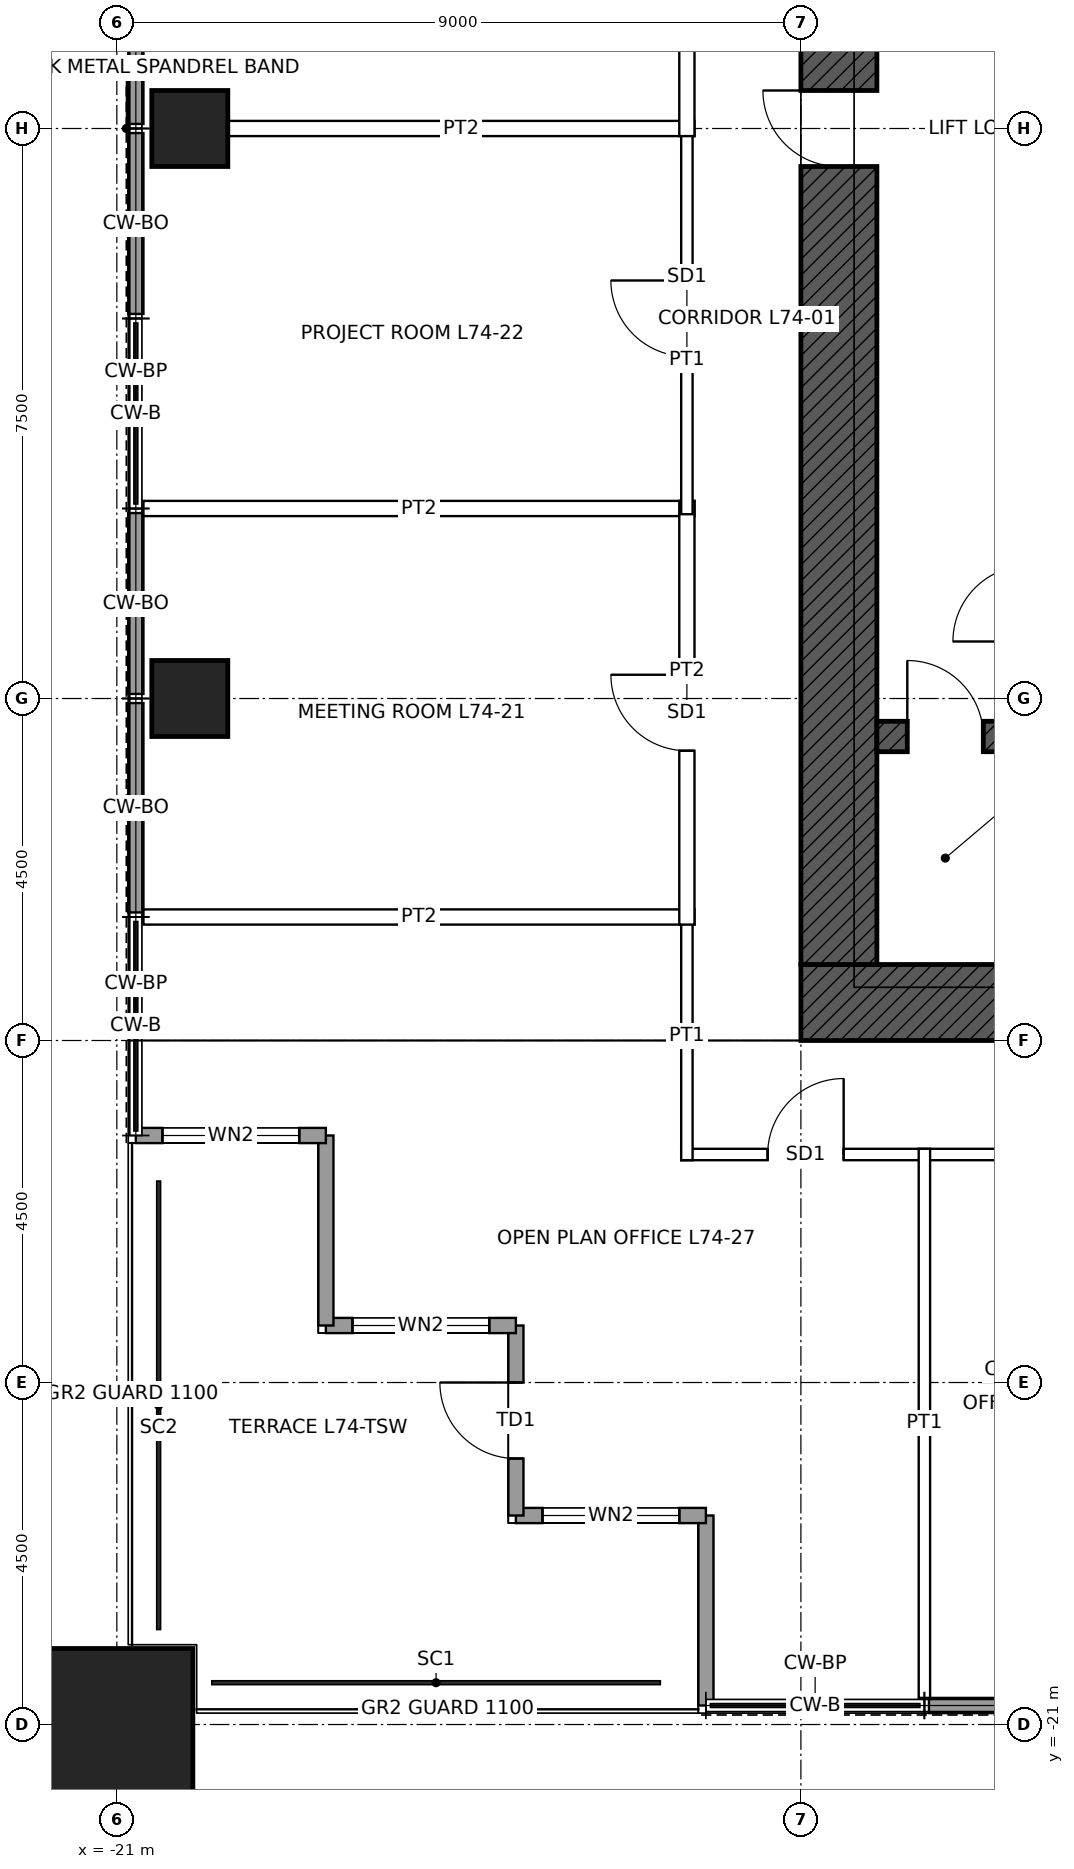
"""IFC4 building model, lengths in metres.
Left out: names, types, materials, properties, quantities, classifications, styles, units other than length and angle.
Written with IfcOpenShell. Run it as: python <this file> out.ifc"""

import sys

from ifc_helpers import new_model, si_unit, direction, frame, frame_2d, origin, origin_2d, place, context, subcontext, project, spatial, rectangle, hollow_rectangle, extrude, element, fill, save


model = new_model("IFC4")
c1 = context("Model", 3, precision=1e-05, world=origin(), true_north=direction((0.0, 1.0)))
c2 = subcontext(c1, "Body", "Model", "MODEL_VIEW")
j1 = project(units=[si_unit("LENGTHUNIT", "METRE"), si_unit("PLANEANGLEUNIT", "RADIAN")], contexts=[c1])
p1 = place(None, origin())
s1 = spatial("IfcSite", under=j1, at=p1, CompositionType="ELEMENT")
p2 = place(p1, origin())
s2 = spatial("IfcBuilding", under=s1, at=p2, CompositionType="ELEMENT")
p3 = place(p2, frame((0.0, 0.0, 331.9)))
s3 = spatial("IfcBuildingStorey", under=s2, at=p3, CompositionType="ELEMENT", Elevation=331.9)
p4 = place(p3, frame((-21.0, -21.0, 0.0), z_axis=(0.0, 0.0, 1.0), x_axis=(1.0, 0.0, 0.0)))
e1 = element("IfcColumn", 1, at=p4, inside=s3, PredefinedType="COLUMN", context=c2, shape_type="SweptSolid", body=[
    extrude(hollow_rectangle(XDim=2.0, YDim=2.0, WallThickness=0.095, at=origin_2d()), origin(), (0.0, 0.0, 1.0), 4.0),
])
for number, where, z_axis, x_axis in (
    (2, (-20.04, -7.5, 0.0), (0.0, 0.0, 1.0), (1.0, 0.0, 0.0)),
    (3, (-20.04, 0.0, 0.0), (0.0, 0.0, 1.0), (1.0, 0.0, 0.0)),
):
    element("IfcColumn", number, at=place(p3, frame(where, z_axis=z_axis, x_axis=x_axis)), inside=s3, PredefinedType="COLUMN", context=c2, shape_type="SweptSolid", body=[
        extrude(hollow_rectangle(XDim=1.0, YDim=1.0, WallThickness=0.075, at=origin_2d()), origin(), (0.0, 0.0, 1.0), 4.0),
    ])
p5 = place(p3, frame((12.0, -11.5, 0.0), z_axis=(0.0, 0.0, 1.0), x_axis=(-1.0, 0.0, 0.0)))
e4 = element("IfcWall", 4, at=p5, inside=s3, PredefinedType="SHEAR", context=c2, shape_type="SweptSolid", body=[
    extrude(rectangle(XDim=24.0, YDim=1.0, at=frame_2d((12.0, 0.0))), origin(), (0.0, 0.0, 1.0), 4.0),
])
p6 = place(p5, frame((11.5, 0.0, 0.0)))
e5 = element("IfcOpeningElement", 5, at=p6, cuts=e4, PredefinedType="OPENING", context=c2, shape_type="SweptSolid", body=[
    extrude(rectangle(XDim=1.0, YDim=2.1, at=frame_2d((0.5, 1.05))), frame((0.0, 0.51, 0.0), z_axis=(0.0, -1.0, 0.0), x_axis=(1.0, 0.0, 0.0)), (0.0, 0.0, 1.0), 1.02),
])
p7 = place(p5, frame((1.0, 0.0, 0.0)))
e6 = element("IfcOpeningElement", 6, at=p7, cuts=e4, PredefinedType="OPENING", context=c2, shape_type="SweptSolid", body=[
    extrude(rectangle(XDim=1.0, YDim=2.4, at=frame_2d((0.5, 1.2))), frame((0.0, 0.51, 0.0), z_axis=(0.0, -1.0, 0.0), x_axis=(1.0, 0.0, 0.0)), (0.0, 0.0, 1.0), 1.02),
])
p8 = place(p3, frame((-11.5, -11.0, 0.0), z_axis=(0.0, 0.0, 1.0), x_axis=(0.0, 1.0, 0.0)))
e7 = element("IfcWall", 7, at=p8, inside=s3, PredefinedType="SHEAR", context=c2, shape_type="SweptSolid", body=[
    extrude(rectangle(XDim=22.0, YDim=1.0, at=frame_2d((11.0, 0.0))), origin(), (0.0, 0.0, 1.0), 4.0),
])
p9 = place(p8, frame((10.5, 0.0, 0.0)))
e8 = element("IfcOpeningElement", 8, at=p9, cuts=e7, PredefinedType="OPENING", context=c2, shape_type="SweptSolid", body=[
    extrude(rectangle(XDim=1.0, YDim=2.4, at=frame_2d((0.5, 1.2))), frame((0.0, 0.51, 0.0), z_axis=(0.0, -1.0, 0.0), x_axis=(1.0, 0.0, 0.0)), (0.0, 0.0, 1.0), 1.02),
])
p10 = place(p3, frame((-11.0, -8.0, 0.0), z_axis=(0.0, 0.0, 1.0), x_axis=(1.0, 0.0, 0.0)))
e9 = element("IfcWall", 9, at=p10, inside=s3, PredefinedType="SHEAR", context=c2, shape_type="SweptSolid", body=[
    extrude(rectangle(XDim=2.0, YDim=0.4, at=frame_2d((1.0, 0.0))), origin(), (0.0, 0.0, 1.0), 4.0),
])
p11 = place(p10, frame((0.4, 0.0, 0.0)))
e10 = element("IfcOpeningElement", 10, at=p11, cuts=e9, PredefinedType="OPENING", context=c2, shape_type="SweptSolid", body=[
    extrude(rectangle(XDim=1.0, YDim=2.1, at=frame_2d((0.5, 1.05))), frame((0.0, 0.21, 0.0), z_axis=(0.0, -1.0, 0.0), x_axis=(1.0, 0.0, 0.0)), (0.0, 0.0, 1.0), 0.42),
])
p12 = place(p3, frame((-13.25, -20.75, 0.0), z_axis=(0.0, 0.0, 1.0), x_axis=(0.0, 1.0, 0.0)))
e11 = element("IfcWall", 11, at=p12, inside=s3, PredefinedType="SOLIDWALL", context=c2, shape_type="SweptSolid", body=[
    extrude(rectangle(XDim=2.5, YDim=0.2, at=frame_2d((1.25, 0.0))), origin(), (0.0, 0.0, 1.0), 3.8),
])
p13 = place(p3, frame((-13.25, -18.25, 0.0), z_axis=(0.0, 0.0, 1.0), x_axis=(-1.0, 0.0, 0.0)))
e12 = element("IfcWall", 12, at=p13, inside=s3, PredefinedType="SOLIDWALL", context=c2, shape_type="SweptSolid", body=[
    extrude(rectangle(XDim=2.5, YDim=0.2, at=frame_2d((1.25, 0.0))), origin(), (0.0, 0.0, 1.0), 3.8),
])
p14 = place(p13, frame((0.35, 0.0, 0.3)))
e13 = element("IfcOpeningElement", 13, at=p14, cuts=e12, PredefinedType="OPENING", context=c2, shape_type="SweptSolid", body=[
    extrude(rectangle(XDim=1.8, YDim=2.4, at=frame_2d((0.9, 1.2))), frame((0.0, 0.11, 0.0), z_axis=(0.0, -1.0, 0.0), x_axis=(1.0, 0.0, 0.0)), (0.0, 0.0, 1.0), 0.22),
])
p15 = place(p3, frame((-15.75, -18.25, 0.0), z_axis=(0.0, 0.0, 1.0), x_axis=(0.0, 1.0, 0.0)))
e14 = element("IfcWall", 14, at=p15, inside=s3, PredefinedType="SOLIDWALL", context=c2, shape_type="SweptSolid", body=[
    extrude(rectangle(XDim=2.5, YDim=0.2, at=frame_2d((1.25, 0.0))), origin(), (0.0, 0.0, 1.0), 2.888),
])
p16 = place(p15, frame((0.75, 0.0, 0.0)))
e15 = element("IfcOpeningElement", 15, at=p16, cuts=e14, PredefinedType="OPENING", context=c2, shape_type="SweptSolid", body=[
    extrude(rectangle(XDim=1.0, YDim=2.4, at=frame_2d((0.5, 1.2))), frame((0.0, 0.11, 0.0), z_axis=(0.0, -1.0, 0.0), x_axis=(1.0, 0.0, 0.0)), (0.0, 0.0, 1.0), 0.22),
])
p17 = place(p3, frame((-15.75, -15.75, 0.0), z_axis=(0.0, 0.0, 1.0), x_axis=(-1.0, 0.0, 0.0)))
e16 = element("IfcWall", 16, at=p17, inside=s3, PredefinedType="SOLIDWALL", context=c2, shape_type="SweptSolid", body=[
    extrude(rectangle(XDim=2.5, YDim=0.2, at=frame_2d((1.25, 0.0))), origin(), (0.0, 0.0, 1.0), 3.8),
])
p18 = place(p17, frame((0.35, 0.0, 0.3)))
e17 = element("IfcOpeningElement", 17, at=p18, cuts=e16, PredefinedType="OPENING", context=c2, shape_type="SweptSolid", body=[
    extrude(rectangle(XDim=1.8, YDim=2.4, at=frame_2d((0.9, 1.2))), frame((0.0, 0.11, 0.0), z_axis=(0.0, -1.0, 0.0), x_axis=(1.0, 0.0, 0.0)), (0.0, 0.0, 1.0), 0.22),
])
p19 = place(p3, frame((-18.25, -15.75, 0.0), z_axis=(0.0, 0.0, 1.0), x_axis=(0.0, 1.0, 0.0)))
e18 = element("IfcWall", 18, at=p19, inside=s3, PredefinedType="SOLIDWALL", context=c2, shape_type="SweptSolid", body=[
    extrude(rectangle(XDim=2.5, YDim=0.2, at=frame_2d((1.25, 0.0))), origin(), (0.0, 0.0, 1.0), 3.8),
])
p20 = place(p3, frame((-18.25, -13.25, 0.0), z_axis=(0.0, 0.0, 1.0), x_axis=(-1.0, 0.0, 0.0)))
e19 = element("IfcWall", 19, at=p20, inside=s3, PredefinedType="SOLIDWALL", context=c2, shape_type="SweptSolid", body=[
    extrude(rectangle(XDim=2.5, YDim=0.2, at=frame_2d((1.25, 0.0))), origin(), (0.0, 0.0, 1.0), 3.8),
])
p21 = place(p20, frame((0.35, 0.0, 0.3)))
e20 = element("IfcOpeningElement", 20, at=p21, cuts=e19, PredefinedType="OPENING", context=c2, shape_type="SweptSolid", body=[
    extrude(rectangle(XDim=1.8, YDim=2.4, at=frame_2d((0.9, 1.2))), frame((0.0, 0.11, 0.0), z_axis=(0.0, -1.0, 0.0), x_axis=(1.0, 0.0, 0.0)), (0.0, 0.0, 1.0), 0.22),
])
for number, where, z_axis, x_axis in (
    (21, (-7.56, -20.75, 0.0), (0.0, 0.0, 1.0), (-1.0, 0.0, 0.0)),
    (22, (-20.75, -10.315, 0.0), (0.0, 0.0, 1.0), (0.0, 1.0, 0.0)),
):
    element("IfcWall", number, at=place(p3, frame(where, z_axis=z_axis, x_axis=x_axis)), inside=s3, PredefinedType="SOLIDWALL", context=c2, shape_type="SweptSolid", body=[
        extrude(rectangle(XDim=2.755, YDim=0.2, at=frame_2d((1.377, 0.0))), origin(), (0.0, 0.0, 1.0), 3.8),
    ])
for number, where, z_axis, x_axis in (
    (23, (-20.75, -7.44, 0.0), (0.0, 0.0, 1.0), (0.0, 1.0, 0.0)),
    (24, (-20.75, -2.44, 0.0), (0.0, 0.0, 1.0), (0.0, 1.0, 0.0)),
    (25, (-20.75, 0.06, 0.0), (0.0, 0.0, 1.0), (0.0, 1.0, 0.0)),
):
    element("IfcWall", number, at=place(p3, frame(where, z_axis=z_axis, x_axis=x_axis)), inside=s3, PredefinedType="SOLIDWALL", context=c2, shape_type="SweptSolid", body=[
        extrude(rectangle(XDim=2.38, YDim=0.2, at=frame_2d((1.19, 0.0))), origin(), (0.0, 0.0, 1.0), 3.8),
    ])
p22 = place(p3, frame((-13.575, -13.5, 0.0), z_axis=(0.0, 0.0, 1.0), x_axis=(1.0, 0.0, 0.0)))
e26 = element("IfcWall", 26, at=p22, inside=s3, PredefinedType="PARTITIONING", context=c2, shape_type="SweptSolid", body=[
    extrude(rectangle(XDim=27.15, YDim=0.15, at=frame_2d((13.575, 0.0))), origin(), (0.0, 0.0, 1.0), 3.8),
])
p23 = place(p22, frame((21.475, 0.0, 0.0)))
e27 = element("IfcOpeningElement", 27, at=p23, cuts=e26, PredefinedType="OPENING", context=c2, shape_type="SweptSolid", body=[
    extrude(rectangle(XDim=1.0, YDim=2.4, at=frame_2d((0.5, 1.2))), frame((0.0, 0.085, 0.0), z_axis=(0.0, -1.0, 0.0), x_axis=(1.0, 0.0, 0.0)), (0.0, 0.0, 1.0), 0.17),
])
p24 = place(p22, frame((19.325, 0.0, 0.0)))
e28 = element("IfcOpeningElement", 28, at=p24, cuts=e26, PredefinedType="OPENING", context=c2, shape_type="SweptSolid", body=[
    extrude(rectangle(XDim=1.0, YDim=2.4, at=frame_2d((0.5, 1.2))), frame((0.0, 0.085, 0.0), z_axis=(0.0, -1.0, 0.0), x_axis=(1.0, 0.0, 0.0)), (0.0, 0.0, 1.0), 0.17),
])
p25 = place(p22, frame((16.825, 0.0, 0.0)))
e29 = element("IfcOpeningElement", 29, at=p25, cuts=e26, PredefinedType="OPENING", context=c2, shape_type="SweptSolid", body=[
    extrude(rectangle(XDim=1.0, YDim=2.4, at=frame_2d((0.5, 1.2))), frame((0.0, 0.085, 0.0), z_axis=(0.0, -1.0, 0.0), x_axis=(1.0, 0.0, 0.0)), (0.0, 0.0, 1.0), 0.17),
])
p26 = place(p22, frame((14.675, 0.0, 0.0)))
e30 = element("IfcOpeningElement", 30, at=p26, cuts=e26, PredefinedType="OPENING", context=c2, shape_type="SweptSolid", body=[
    extrude(rectangle(XDim=1.0, YDim=2.4, at=frame_2d((0.5, 1.2))), frame((0.0, 0.085, 0.0), z_axis=(0.0, -1.0, 0.0), x_axis=(1.0, 0.0, 0.0)), (0.0, 0.0, 1.0), 0.17),
])
p27 = place(p22, frame((11.475, 0.0, 0.0)))
e31 = element("IfcOpeningElement", 31, at=p27, cuts=e26, PredefinedType="OPENING", context=c2, shape_type="SweptSolid", body=[
    extrude(rectangle(XDim=1.0, YDim=2.4, at=frame_2d((0.5, 1.2))), frame((0.0, 0.085, 0.0), z_axis=(0.0, -1.0, 0.0), x_axis=(1.0, 0.0, 0.0)), (0.0, 0.0, 1.0), 0.17),
])
p28 = place(p22, frame((9.325, 0.0, 0.0)))
e32 = element("IfcOpeningElement", 32, at=p28, cuts=e26, PredefinedType="OPENING", context=c2, shape_type="SweptSolid", body=[
    extrude(rectangle(XDim=1.0, YDim=2.4, at=frame_2d((0.5, 1.2))), frame((0.0, 0.085, 0.0), z_axis=(0.0, -1.0, 0.0), x_axis=(1.0, 0.0, 0.0)), (0.0, 0.0, 1.0), 0.17),
])
p29 = place(p22, frame((6.825, 0.0, 0.0)))
e33 = element("IfcOpeningElement", 33, at=p29, cuts=e26, PredefinedType="OPENING", context=c2, shape_type="SweptSolid", body=[
    extrude(rectangle(XDim=1.0, YDim=2.4, at=frame_2d((0.5, 1.2))), frame((0.0, 0.085, 0.0), z_axis=(0.0, -1.0, 0.0), x_axis=(1.0, 0.0, 0.0)), (0.0, 0.0, 1.0), 0.17),
])
p30 = place(p22, frame((4.137, 0.0, 0.0)))
e34 = element("IfcOpeningElement", 34, at=p30, cuts=e26, PredefinedType="OPENING", context=c2, shape_type="SweptSolid", body=[
    extrude(rectangle(XDim=1.0, YDim=2.4, at=frame_2d((0.5, 1.2))), frame((0.0, 0.085, 0.0), z_axis=(0.0, -1.0, 0.0), x_axis=(1.0, 0.0, 0.0)), (0.0, 0.0, 1.0), 0.17),
])
p31 = place(p22, frame((25.278, 0.0, 0.0)))
e35 = element("IfcOpeningElement", 35, at=p31, cuts=e26, PredefinedType="OPENING", context=c2, shape_type="SweptSolid", body=[
    extrude(rectangle(XDim=1.0, YDim=2.4, at=frame_2d((0.5, 1.2))), frame((0.0, 0.085, 0.0), z_axis=(0.0, -1.0, 0.0), x_axis=(1.0, 0.0, 0.0)), (0.0, 0.0, 1.0), 0.17),
])
p32 = place(p22, frame((1.137, 0.0, 0.0)))
e36 = element("IfcOpeningElement", 36, at=p32, cuts=e26, PredefinedType="OPENING", context=c2, shape_type="SweptSolid", body=[
    extrude(rectangle(XDim=1.0, YDim=2.4, at=frame_2d((0.5, 1.2))), frame((0.0, 0.085, 0.0), z_axis=(0.0, -1.0, 0.0), x_axis=(1.0, 0.0, 0.0)), (0.0, 0.0, 1.0), 0.17),
])
for number, where, z_axis, x_axis in (
    (37, (-20.65, -10.375, 0.0), (0.0, 0.0, 1.0), (1.0, 0.0, 0.0)),
    (38, (-20.65, -5.0, 0.0), (0.0, 0.0, 1.0), (1.0, 0.0, 0.0)),
):
    element("IfcWall", number, at=place(p3, frame(where, z_axis=z_axis, x_axis=x_axis)), inside=s3, PredefinedType="PARTITIONING", context=c2, shape_type="SweptSolid", body=[
        extrude(rectangle(XDim=7.25, YDim=0.2, at=frame_2d((3.625, 0.0))), origin(), (0.0, 0.0, 1.0), 3.8),
    ])
p33 = place(p3, frame((-19.54, 0.0, 0.0), z_axis=(0.0, 0.0, 1.0), x_axis=(1.0, 0.0, 0.0)))
e39 = element("IfcWall", 39, at=p33, inside=s3, PredefinedType="PARTITIONING", context=c2, shape_type="SweptSolid", body=[
    extrude(rectangle(XDim=6.14, YDim=0.2, at=frame_2d((3.07, 0.0))), origin(), (0.0, 0.0, 1.0), 2.769),
])
p34 = place(p3, frame((-13.5, -13.575, 0.0), z_axis=(0.0, 0.0, 1.0), x_axis=(0.0, 1.0, 0.0)))
e40 = element("IfcWall", 40, at=p34, inside=s3, PredefinedType="PARTITIONING", context=c2, shape_type="SweptSolid", body=[
    extrude(rectangle(XDim=3.275, YDim=0.15, at=frame_2d((1.637, 0.0))), origin(), (0.0, 0.0, 1.0), 3.8),
])
p35 = place(p3, frame((-13.5, -10.475, 0.0), z_axis=(0.0, 0.0, 1.0), x_axis=(0.0, 1.0, 0.0)))
e41 = element("IfcWall", 41, at=p35, inside=s3, PredefinedType="PARTITIONING", context=c2, shape_type="SweptSolid", body=[
    extrude(rectangle(XDim=5.575, YDim=0.2, at=frame_2d((2.788, 0.0))), origin(), (0.0, 0.0, 1.0), 3.8),
])
p36 = place(p35, frame((2.288, 0.0, 0.0)))
e42 = element("IfcOpeningElement", 42, at=p36, cuts=e41, PredefinedType="OPENING", context=c2, shape_type="SweptSolid", body=[
    extrude(rectangle(XDim=1.0, YDim=2.4, at=frame_2d((0.5, 1.2))), frame((0.0, 0.11, 0.0), z_axis=(0.0, -1.0, 0.0), x_axis=(1.0, 0.0, 0.0)), (0.0, 0.0, 1.0), 0.22),
])
p37 = place(p3, frame((-13.5, -5.075, 0.0), z_axis=(0.0, 0.0, 1.0), x_axis=(0.0, 1.0, 0.0)))
e43 = element("IfcWall", 43, at=p37, inside=s3, PredefinedType="PARTITIONING", context=c2, shape_type="SweptSolid", body=[
    extrude(rectangle(XDim=5.15, YDim=0.15, at=frame_2d((2.575, 0.0))), origin(), (0.0, 0.0, 1.0), 3.8),
])
p38 = place(p37, frame((2.075, 0.0, 0.0)))
e44 = element("IfcOpeningElement", 44, at=p38, cuts=e43, PredefinedType="OPENING", context=c2, shape_type="SweptSolid", body=[
    extrude(rectangle(XDim=1.0, YDim=2.4, at=frame_2d((0.5, 1.2))), frame((0.0, 0.085, 0.0), z_axis=(0.0, -1.0, 0.0), x_axis=(1.0, 0.0, 0.0)), (0.0, 0.0, 1.0), 0.17),
])
p39 = place(p3, frame((-13.5, -0.1, 0.0), z_axis=(0.0, 0.0, 1.0), x_axis=(0.0, 1.0, 0.0)))
e45 = element("IfcWall", 45, at=p39, inside=s3, PredefinedType="PARTITIONING", context=c2, shape_type="SweptSolid", body=[
    extrude(rectangle(XDim=5.2, YDim=0.2, at=frame_2d((2.6, 0.0))), origin(), (0.0, 0.0, 1.0), 3.8),
])
p40 = place(p39, frame((2.1, 0.0, 0.0)))
e46 = element("IfcOpeningElement", 46, at=p40, cuts=e45, PredefinedType="OPENING", context=c2, shape_type="SweptSolid", body=[
    extrude(rectangle(XDim=1.0, YDim=2.4, at=frame_2d((0.5, 1.2))), frame((0.0, 0.11, 0.0), z_axis=(0.0, -1.0, 0.0), x_axis=(1.0, 0.0, 0.0)), (0.0, 0.0, 1.0), 0.22),
])
p41 = place(p3, frame((-10.375, -20.65, 0.0), z_axis=(0.0, 0.0, 1.0), x_axis=(0.0, 1.0, 0.0)))
e47 = element("IfcWall", 47, at=p41, inside=s3, PredefinedType="PARTITIONING", context=c2, shape_type="SweptSolid", body=[
    extrude(rectangle(XDim=7.225, YDim=0.15, at=frame_2d((3.612, 0.0))), origin(), (0.0, 0.0, 1.0), 3.8),
])
p42 = place(p14, origin())
e48 = element("IfcWindow", 48, at=p42, inside=s3, PartitioningType="SINGLE_PANEL", PredefinedType="WINDOW", context=c2, shape_type="SweptSolid", body=[
    extrude(rectangle(XDim=1.8, YDim=2.4, at=frame_2d((0.9, 1.2))), frame((0.0, 0.03, 0.0), z_axis=(0.0, -1.0, 0.0), x_axis=(1.0, 0.0, 0.0)), (0.0, 0.0, 1.0), 0.06),
])
fill(e13, e48)
p43 = place(p16, origin())
e49 = element("IfcDoor", 49, at=p43, inside=s3, OperationType="SINGLE_SWING_RIGHT", PredefinedType="DOOR", context=c2, shape_type="SweptSolid", body=[
    extrude(rectangle(XDim=1.0, YDim=2.4, at=frame_2d((0.5, 1.2))), frame((0.0, 0.025, 0.0), z_axis=(0.0, -1.0, 0.0), x_axis=(1.0, 0.0, 0.0)), (0.0, 0.0, 1.0), 0.05),
])
fill(e15, e49)
p44 = place(p18, origin())
e50 = element("IfcWindow", 50, at=p44, inside=s3, PartitioningType="SINGLE_PANEL", PredefinedType="WINDOW", context=c2, shape_type="SweptSolid", body=[
    extrude(rectangle(XDim=1.8, YDim=2.4, at=frame_2d((0.9, 1.2))), frame((0.0, 0.03, 0.0), z_axis=(0.0, -1.0, 0.0), x_axis=(1.0, 0.0, 0.0)), (0.0, 0.0, 1.0), 0.06),
])
fill(e17, e50)
p45 = place(p21, origin())
e51 = element("IfcWindow", 51, at=p45, inside=s3, PartitioningType="SINGLE_PANEL", PredefinedType="WINDOW", context=c2, shape_type="SweptSolid", body=[
    extrude(rectangle(XDim=1.8, YDim=2.4, at=frame_2d((0.9, 1.2))), frame((0.0, 0.03, 0.0), z_axis=(0.0, -1.0, 0.0), x_axis=(1.0, 0.0, 0.0)), (0.0, 0.0, 1.0), 0.06),
])
fill(e20, e51)
p46 = place(p9, origin())
e52 = element("IfcDoor", 52, at=p46, inside=s3, OperationType="SINGLE_SWING_RIGHT", PredefinedType="DOOR", context=c2, shape_type="SweptSolid", body=[
    extrude(rectangle(XDim=1.0, YDim=2.4, at=frame_2d((0.5, 1.2))), frame((0.0, 0.485, 0.0), z_axis=(0.0, -1.0, 0.0), x_axis=(1.0, 0.0, 0.0)), (0.0, 0.0, 1.0), 0.05),
])
fill(e8, e52)
p47 = place(p11, origin())
e53 = element("IfcDoor", 53, at=p47, inside=s3, OperationType="SINGLE_SWING_LEFT", PredefinedType="DOOR", context=c2, shape_type="SweptSolid", body=[
    extrude(rectangle(XDim=1.0, YDim=2.1, at=frame_2d((0.5, 1.05))), frame((0.0, 0.025, 0.0), z_axis=(0.0, -1.0, 0.0), x_axis=(1.0, 0.0, 0.0)), (0.0, 0.0, 1.0), 0.05),
])
fill(e10, e53)
p48 = place(p36, origin())
e54 = element("IfcDoor", 54, at=p48, inside=s3, OperationType="SINGLE_SWING_RIGHT", PredefinedType="DOOR", context=c2, shape_type="SweptSolid", body=[
    extrude(rectangle(XDim=1.0, YDim=2.4, at=frame_2d((0.5, 1.2))), frame((0.0, 0.025, 0.0), z_axis=(0.0, -1.0, 0.0), x_axis=(1.0, 0.0, 0.0)), (0.0, 0.0, 1.0), 0.05),
])
fill(e42, e54)
p49 = place(p38, origin())
e55 = element("IfcDoor", 55, at=p49, inside=s3, OperationType="SINGLE_SWING_RIGHT", PredefinedType="DOOR", context=c2, shape_type="SweptSolid", body=[
    extrude(rectangle(XDim=1.0, YDim=2.4, at=frame_2d((0.5, 1.2))), frame((0.0, 0.025, 0.0), z_axis=(0.0, -1.0, 0.0), x_axis=(1.0, 0.0, 0.0)), (0.0, 0.0, 1.0), 0.05),
])
fill(e44, e55)
p50 = place(p32, origin())
e56 = element("IfcDoor", 56, at=p50, inside=s3, OperationType="SINGLE_SWING_RIGHT", PredefinedType="DOOR", context=c2, shape_type="SweptSolid", body=[
    extrude(rectangle(XDim=1.0, YDim=2.4, at=frame_2d((0.5, 1.2))), frame((0.0, 0.025, 0.0), z_axis=(0.0, -1.0, 0.0), x_axis=(1.0, 0.0, 0.0)), (0.0, 0.0, 1.0), 0.05),
])
fill(e36, e56)
save(model, sys.argv[1])
